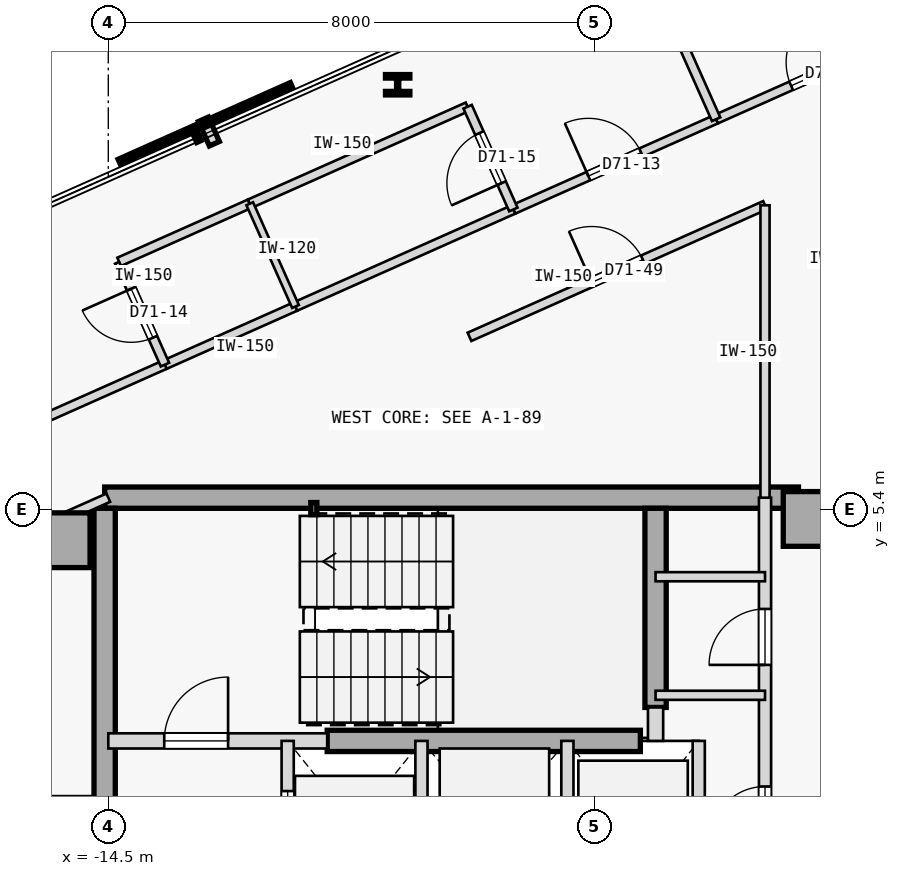
"""IFC4 building model, lengths in metres.
Left out: names, types, materials, properties, quantities, classifications, styles, units other than length and angle.
Written with IfcOpenShell. Run it as: python <this file> out.ifc"""

import sys

from ifc_helpers import new_model, si_unit, direction, frame, frame_2d, origin, origin_2d, place, context, subcontext, project, spatial, rectangle, hollow_rectangle, i_section, extrude, element, fill, save


model = new_model("IFC4")
c1 = context("Model", 3, precision=1e-05, world=origin(), true_north=direction((0.0, 1.0)))
c2 = subcontext(c1, "Body", "Model", "MODEL_VIEW")
j1 = project(units=[si_unit("LENGTHUNIT", "METRE"), si_unit("PLANEANGLEUNIT", "RADIAN")], contexts=[c1])
p1 = place(None, origin())
s1 = spatial("IfcSite", under=j1, at=p1, CompositionType="ELEMENT")
p2 = place(p1, origin())
s2 = spatial("IfcBuilding", under=s1, at=p2, CompositionType="ELEMENT")
p3 = place(p2, frame((0.0, 0.0, 265.55)))
s3 = spatial("IfcBuildingStorey", under=s2, at=p3, CompositionType="ELEMENT", Elevation=265.55)
for number, where, z_axis, x_axis in (
    (1, (-15.25, 4.9, 0.0), (0.0, 0.0, 1.0), (1.0, 0.0, 0.0)),
    (2, (-2.95, 5.25, 0.0), (0.0, 0.0, 1.0), (1.0, 0.0, 0.0)),
):
    element("IfcColumn", number, at=place(p3, frame(where, z_axis=z_axis, x_axis=x_axis)), inside=s3, PredefinedType="COLUMN", context=c2, shape_type="SweptSolid", body=[
        extrude(rectangle(XDim=0.9, YDim=0.9, at=origin_2d()), origin(), (0.0, 0.0, 1.0), 3.35),
    ])
p4 = place(p3, frame((-14.56, 5.6, 0.0), z_axis=(0.0, 0.0, 1.0), x_axis=(1.0, 0.0, 0.0)))
e3 = element("IfcWall", 3, at=p4, inside=s3, PredefinedType="SHEAR", context=c2, shape_type="SweptSolid", body=[
    extrude(rectangle(XDim=11.41, YDim=0.35, at=frame_2d((5.705, 0.0))), origin(), (0.0, 0.0, 1.0), 3.125),
])
p5 = place(p3, frame((-14.56, -5.425, 0.0), z_axis=(0.0, 0.0, 1.0), x_axis=(0.0, 1.0, 0.0)))
e4 = element("IfcWall", 4, at=p5, inside=s3, PredefinedType="SHEAR", context=c2, shape_type="SweptSolid", body=[
    extrude(rectangle(XDim=10.85, YDim=0.35, at=frame_2d((5.425, 0.0))), origin(), (0.0, 0.0, 1.0), 3.125),
])
p6 = place(p3, frame((-5.5, 2.15, 0.0), z_axis=(0.0, 0.0, 1.0), x_axis=(0.0, 1.0, 0.0)))
e5 = element("IfcWall", 5, at=p6, inside=s3, PredefinedType="SHEAR", context=c2, shape_type="SweptSolid", body=[
    extrude(rectangle(XDim=3.275, YDim=0.35, at=frame_2d((1.638, 0.0))), origin(), (0.0, 0.0, 1.0), 3.125),
])
p7 = place(p3, frame((-10.9, 1.6, 0.0), z_axis=(0.0, 0.0, 1.0), x_axis=(1.0, 0.0, 0.0)))
e6 = element("IfcWall", 6, at=p7, inside=s3, PredefinedType="SHEAR", context=c2, shape_type="SweptSolid", body=[
    extrude(rectangle(XDim=5.15, YDim=0.35, at=frame_2d((2.575, 0.0))), origin(), (0.0, 0.0, 1.0), 3.125),
])
p8 = place(p3, frame((-11.12, 5.42, 0.0), z_axis=(0.0, 0.0, 1.0), x_axis=(1.0, 0.0, 0.0)))
e7 = element("IfcColumn", 7, at=p8, inside=s3, PredefinedType="COLUMN", context=c2, shape_type="SweptSolid", body=[
    extrude(hollow_rectangle(XDim=0.1, YDim=0.2, WallThickness=0.008, at=origin_2d()), origin(), (0.0, 0.0, 1.0), 3.35),
])
p9 = place(p3, frame((-9.741, 12.39, 0.0), z_axis=(0.0, 0.0, 1.0), x_axis=(1.0, 0.0, 0.0)))
e8 = element("IfcColumn", 8, at=p9, inside=s3, PredefinedType="COLUMN", context=c2, shape_type="SweptSolid", body=[
    extrude(i_section(OverallWidth=0.401, OverallDepth=0.335, WebThickness=0.036, FlangeThickness=0.058, FilletRadius=0.015, at=origin_2d()), origin(), (0.0, 0.0, 1.0), 3.35),
])
p10 = place(p3, frame((-14.5, 1.6, 0.0), z_axis=(0.0, 0.0, 1.0), x_axis=(1.0, 0.0, 0.0)))
e9 = element("IfcWall", 9, at=p10, inside=s3, PredefinedType="STANDARD", context=c2, shape_type="SweptSolid", body=[
    extrude(rectangle(XDim=3.6, YDim=0.25, at=frame_2d((1.8, 0.0))), origin(), (0.0, 0.0, 1.0), 3.125),
])
p11 = place(p10, frame((0.92, 0.0, 0.0)))
e10 = element("IfcOpeningElement", 10, at=p11, cuts=e9, PredefinedType="OPENING", context=c2, shape_type="SweptSolid", body=[
    extrude(rectangle(XDim=1.05, YDim=2.15, at=frame_2d((0.525, 1.075))), frame((0.0, 0.135, 0.0), z_axis=(0.0, -1.0, 0.0), x_axis=(1.0, 0.0, 0.0)), (0.0, 0.0, 1.0), 0.27),
])
p12 = place(p3, frame((-5.5, 1.6, 0.0), z_axis=(0.0, 0.0, 1.0), x_axis=(0.0, 1.0, 0.0)))
e11 = element("IfcWall", 11, at=p12, inside=s3, PredefinedType="STANDARD", context=c2, shape_type="SweptSolid", body=[
    extrude(rectangle(XDim=0.55, YDim=0.25, at=frame_2d((0.275, 0.0))), origin(), (0.0, 0.0, 1.0), 3.125),
])
p13 = place(p3, frame((-3.7, -1.15, 0.0), z_axis=(0.0, 0.0, 1.0), x_axis=(0.0, 1.0, 0.0)))
e12 = element("IfcWall", 12, at=p13, inside=s3, PredefinedType="STANDARD", context=c2, shape_type="SweptSolid", body=[
    extrude(rectangle(XDim=6.75, YDim=0.2, at=frame_2d((3.375, 0.0))), origin(), (0.0, 0.0, 1.0), 3.125),
])
p14 = place(p13, frame((1.1, 0.0, 0.0)))
e13 = element("IfcOpeningElement", 13, at=p14, cuts=e12, PredefinedType="OPENING", context=c2, shape_type="SweptSolid", body=[
    extrude(rectangle(XDim=0.9, YDim=2.15, at=frame_2d((0.45, 1.075))), frame((0.0, 0.11, 0.0), z_axis=(0.0, -1.0, 0.0), x_axis=(1.0, 0.0, 0.0)), (0.0, 0.0, 1.0), 0.22),
])
p15 = place(p13, frame((4.0, 0.0, 0.0)))
e14 = element("IfcOpeningElement", 14, at=p15, cuts=e12, PredefinedType="OPENING", context=c2, shape_type="SweptSolid", body=[
    extrude(rectangle(XDim=0.92, YDim=2.15, at=frame_2d((0.46, 1.075))), frame((0.0, 0.11, 0.0), z_axis=(0.0, -1.0, 0.0), x_axis=(1.0, 0.0, 0.0)), (0.0, 0.0, 1.0), 0.22),
])
p16 = place(p3, frame((-11.55, -1.15, 0.0), z_axis=(0.0, 0.0, 1.0), x_axis=(0.0, 1.0, 0.0)))
e15 = element("IfcWall", 15, at=p16, inside=s3, PredefinedType="STANDARD", context=c2, shape_type="SweptSolid", body=[
    extrude(rectangle(XDim=2.75, YDim=0.2, at=frame_2d((1.375, 0.0))), origin(), (0.0, 0.0, 1.0), 3.125),
])
p17 = place(p16, frame((0.825, 0.0, 0.0)))
e16 = element("IfcOpeningElement", 16, at=p17, cuts=e15, PredefinedType="OPENING", context=c2, shape_type="SweptSolid", body=[
    extrude(rectangle(XDim=1.1, YDim=2.15, at=frame_2d((0.55, 1.075))), frame((0.0, 0.11, 0.0), z_axis=(0.0, -1.0, 0.0), x_axis=(1.0, 0.0, 0.0)), (0.0, 0.0, 1.0), 0.22),
])
for number, where, z_axis, x_axis in (
    (17, (-9.35, -1.15, 0.0), (0.0, 0.0, 1.0), (0.0, 1.0, 0.0)),
    (18, (-6.95, -1.15, 0.0), (0.0, 0.0, 1.0), (0.0, 1.0, 0.0)),
    (19, (-4.79, -1.15, 0.0), (0.0, 0.0, 1.0), (0.0, 1.0, 0.0)),
):
    element("IfcWall", number, at=place(p3, frame(where, z_axis=z_axis, x_axis=x_axis)), inside=s3, PredefinedType="STANDARD", context=c2, shape_type="SweptSolid", body=[
        extrude(rectangle(XDim=2.75, YDim=0.2, at=frame_2d((1.375, 0.0))), origin(), (0.0, 0.0, 1.0), 3.125),
    ])
for number, where, z_axis, x_axis in (
    (20, (-5.5, 4.3, 0.0), (0.0, 0.0, 1.0), (1.0, 0.0, 0.0)),
    (21, (-5.5, 2.35, 0.0), (0.0, 0.0, 1.0), (1.0, 0.0, 0.0)),
):
    element("IfcWall", number, at=place(p3, frame(where, z_axis=z_axis, x_axis=x_axis)), inside=s3, PredefinedType="PARTITIONING", context=c2, shape_type="SweptSolid", body=[
        extrude(rectangle(XDim=1.8, YDim=0.15, at=frame_2d((0.9, 0.0))), origin(), (0.0, 0.0, 1.0), 3.125),
    ])
p18 = place(p3, frame((-16.903, 6.303, 0.0), z_axis=(0.0, 0.0, 1.0), x_axis=(0.913543802, 0.40674036169, 0.0)))
e22 = element("IfcWall", 22, at=p18, inside=s3, PredefinedType="PARTITIONING", context=c2, shape_type="SweptSolid", body=[
    extrude(rectangle(XDim=3.65, YDim=0.15, at=frame_2d((1.825, 0.0))), origin(), (0.0, 0.0, 1.0), 3.125),
])
p19 = place(p3, frame((-7.839, 10.339, 0.0), z_axis=(0.0, 0.0, 1.0), x_axis=(0.913543802, 0.40674036169, 0.0)))
e23 = element("IfcWall", 23, at=p19, inside=s3, PredefinedType="PARTITIONING", context=c2, shape_type="SweptSolid", body=[
    extrude(rectangle(XDim=3.65, YDim=0.15, at=frame_2d((1.825, 0.0))), origin(), (0.0, 0.0, 1.0), 3.125),
])
p20 = place(p19, frame((1.35, 0.0, 0.0)))
e24 = element("IfcOpeningElement", 24, at=p20, cuts=e23, PredefinedType="OPENING", context=c2, shape_type="SweptSolid", body=[
    extrude(rectangle(XDim=0.95, YDim=2.15, at=frame_2d((0.475, 1.075))), frame((0.0, 0.085, 0.0), z_axis=(0.0, -1.0, 0.0), x_axis=(1.0, 0.0, 0.0)), (0.0, 0.0, 1.0), 0.17),
])
p21 = place(p3, frame((-13.568, 7.788, 0.0), z_axis=(0.0, 0.0, 1.0), x_axis=(0.913558622212, 0.406707073682, 0.0)))
e25 = element("IfcWall", 25, at=p21, inside=s3, PredefinedType="PARTITIONING", context=c2, shape_type="SweptSolid", body=[
    extrude(rectangle(XDim=2.35, YDim=0.15, at=frame_2d((1.175, 0.0))), origin(), (0.0, 0.0, 1.0), 3.125),
])
p22 = place(p3, frame((-11.421, 8.744, 0.0), z_axis=(0.0, 0.0, 1.0), x_axis=(0.913539234326, 0.406750620585, 0.0)))
e26 = element("IfcWall", 26, at=p22, inside=s3, PredefinedType="PARTITIONING", context=c2, shape_type="SweptSolid", body=[
    extrude(rectangle(XDim=3.922, YDim=0.15, at=frame_2d((1.961, 0.0))), origin(), (0.0, 0.0, 1.0), 3.125),
])
p23 = place(p3, frame((-4.504, 11.823, 0.0), z_axis=(0.0, 0.0, 1.0), x_axis=(0.913543802, 0.40674036169, 0.0)))
e27 = element("IfcWall", 27, at=p23, inside=s3, PredefinedType="PARTITIONING", context=c2, shape_type="SweptSolid", body=[
    extrude(rectangle(XDim=3.65, YDim=0.15, at=frame_2d((1.825, 0.0))), origin(), (0.0, 0.0, 1.0), 3.125),
])
p24 = place(p23, frame((1.35, 0.0, 0.0)))
e28 = element("IfcOpeningElement", 28, at=p24, cuts=e27, PredefinedType="OPENING", context=c2, shape_type="SweptSolid", body=[
    extrude(rectangle(XDim=0.95, YDim=2.15, at=frame_2d((0.475, 1.075))), frame((0.0, 0.085, 0.0), z_axis=(0.0, -1.0, 0.0), x_axis=(1.0, 0.0, 0.0)), (0.0, 0.0, 1.0), 0.17),
])
p25 = place(p3, frame((-18.661, 3.747, 0.0), z_axis=(0.0, 0.0, 1.0), x_axis=(0.913535055583, 0.40676000568, 0.0)))
e29 = element("IfcWall", 29, at=p25, inside=s3, PredefinedType="PARTITIONING", context=c2, shape_type="SweptSolid", body=[
    extrude(rectangle(XDim=4.555, YDim=0.15, at=frame_2d((2.277, 0.0))), origin(), (0.0, 0.0, 1.0), 3.125),
])
p26 = place(p25, frame((1.134, 0.0, 0.0)))
e30 = element("IfcOpeningElement", 30, at=p26, cuts=e29, PredefinedType="OPENING", context=c2, shape_type="SweptSolid", body=[
    extrude(rectangle(XDim=0.92, YDim=2.15, at=frame_2d((0.46, 1.075))), frame((0.0, 0.085, 0.0), z_axis=(0.0, -1.0, 0.0), x_axis=(1.0, 0.0, 0.0)), (0.0, 0.0, 1.0), 0.17),
])
p27 = place(p3, frame((-8.56, 8.244, 0.0), z_axis=(0.0, 0.0, 1.0), x_axis=(0.91354831274, 0.406730230362, 0.0)))
e31 = element("IfcWall", 31, at=p27, inside=s3, PredefinedType="PARTITIONING", context=c2, shape_type="SweptSolid", body=[
    extrude(rectangle(XDim=5.32, YDim=0.15, at=frame_2d((2.66, 0.0))), origin(), (0.0, 0.0, 1.0), 3.125),
])
p28 = place(p27, frame((2.2, 0.0, 0.0)))
e32 = element("IfcOpeningElement", 32, at=p28, cuts=e31, PredefinedType="OPENING", context=c2, shape_type="SweptSolid", body=[
    extrude(rectangle(XDim=0.92, YDim=2.15, at=frame_2d((0.46, 1.075))), frame((0.0, 0.085, 0.0), z_axis=(0.0, -1.0, 0.0), x_axis=(1.0, 0.0, 0.0)), (0.0, 0.0, 1.0), 0.17),
])
p29 = place(p3, frame((-3.7, 5.6, 0.0), z_axis=(0.0, 0.0, 1.0), x_axis=(5.077173e-05, 0.999999998711, 0.0)))
e33 = element("IfcWall", 33, at=p29, inside=s3, PredefinedType="PARTITIONING", context=c2, shape_type="SweptSolid", body=[
    extrude(rectangle(XDim=4.809, YDim=0.15, at=frame_2d((2.404, 0.0))), origin(), (0.0, 0.0, 1.0), 3.125),
])
p30 = place(p3, frame((-13.568, 7.788, 0.0), z_axis=(0.0, 0.0, 1.0), x_axis=(-0.406750635596, 0.913539227643, 0.0)))
e34 = element("IfcWall", 34, at=p30, inside=s3, PredefinedType="PARTITIONING", context=c2, shape_type="SweptSolid", body=[
    extrude(rectangle(XDim=1.85, YDim=0.15, at=frame_2d((0.925, 0.0))), origin(), (0.0, 0.0, 1.0), 3.125),
])
p31 = place(p30, frame((0.485, 0.0, 0.0)))
e35 = element("IfcOpeningElement", 35, at=p31, cuts=e34, PredefinedType="OPENING", context=c2, shape_type="SweptSolid", body=[
    extrude(rectangle(XDim=0.88, YDim=2.15, at=frame_2d((0.44, 1.075))), frame((0.0, 0.085, 0.0), z_axis=(0.0, -1.0, 0.0), x_axis=(1.0, 0.0, 0.0)), (0.0, 0.0, 1.0), 0.17),
])
p32 = place(p3, frame((-14.321, 9.478, 0.0), z_axis=(0.0, 0.0, 1.0), x_axis=(0.913502828817, 0.406832375486, 0.0)))
e36 = element("IfcWall", 36, at=p32, inside=s3, PredefinedType="PARTITIONING", context=c2, shape_type="SweptSolid", body=[
    extrude(rectangle(XDim=2.35, YDim=0.15, at=frame_2d((1.175, 0.0))), origin(), (0.0, 0.0, 1.0), 3.125),
])
p33 = place(p3, frame((-12.174, 10.434, 0.0), z_axis=(0.0, 0.0, 1.0), x_axis=(0.913549532696, 0.406727490232, 0.0)))
e37 = element("IfcWall", 37, at=p33, inside=s3, PredefinedType="PARTITIONING", context=c2, shape_type="SweptSolid", body=[
    extrude(rectangle(XDim=3.922, YDim=0.15, at=frame_2d((1.961, 0.0))), origin(), (0.0, 0.0, 1.0), 3.125),
])
p34 = place(p3, frame((-7.839, 10.339, 0.0), z_axis=(0.0, 0.0, 1.0), x_axis=(-0.406701600856, 0.913561058639, 0.0)))
e38 = element("IfcWall", 38, at=p34, inside=s3, PredefinedType="PARTITIONING", context=c2, shape_type="SweptSolid", body=[
    extrude(rectangle(XDim=1.85, YDim=0.15, at=frame_2d((0.925, 0.0))), origin(), (0.0, 0.0, 1.0), 3.125),
])
p35 = place(p34, frame((0.475, 0.0, 0.0)))
e39 = element("IfcOpeningElement", 39, at=p35, cuts=e38, PredefinedType="OPENING", context=c2, shape_type="SweptSolid", body=[
    extrude(rectangle(XDim=0.9, YDim=2.15, at=frame_2d((0.45, 1.075))), frame((0.0, 0.085, 0.0), z_axis=(0.0, -1.0, 0.0), x_axis=(1.0, 0.0, 0.0)), (0.0, 0.0, 1.0), 0.17),
])
p36 = place(p3, frame((-4.504, 11.823, 0.0), z_axis=(0.0, 0.0, 1.0), x_axis=(-0.406733350739, 0.913546923478, 0.0)))
e40 = element("IfcWall", 40, at=p36, inside=s3, PredefinedType="PARTITIONING", context=c2, shape_type="SweptSolid", body=[
    extrude(rectangle(XDim=3.198, YDim=0.15, at=frame_2d((1.599, 0.0))), origin(), (0.0, 0.0, 1.0), 3.125),
])
p37 = place(p3, frame((-11.421, 8.744, 0.0), z_axis=(0.0, 0.0, 1.0), x_axis=(-0.406811725227, 0.913512025218, 0.0)))
e41 = element("IfcWall", 41, at=p37, inside=s3, PredefinedType="PARTITIONING", context=c2, shape_type="SweptSolid", body=[
    extrude(rectangle(XDim=1.85, YDim=0.12, at=frame_2d((0.925, 0.0))), origin(), (0.0, 0.0, 1.0), 3.125),
])
p38 = place(p11, origin())
e42 = element("IfcDoor", 42, at=p38, inside=s3, OperationType="SINGLE_SWING_RIGHT", PredefinedType="DOOR", context=c2, shape_type="SweptSolid", body=[
    extrude(rectangle(XDim=1.05, YDim=2.15, at=frame_2d((0.525, 1.075))), frame((0.0, 0.025, 0.0), z_axis=(0.0, -1.0, 0.0), x_axis=(1.0, 0.0, 0.0)), (0.0, 0.0, 1.0), 0.05),
])
fill(e10, e42)
p39 = place(p17, origin())
e43 = element("IfcDoor", 43, at=p39, inside=s3, OperationType="SLIDING_TO_RIGHT", PredefinedType="DOOR", context=c2, shape_type="SweptSolid", body=[
    extrude(rectangle(XDim=1.1, YDim=2.15, at=frame_2d((0.55, 1.075))), frame((0.0, 0.025, 0.0), z_axis=(0.0, -1.0, 0.0), x_axis=(1.0, 0.0, 0.0)), (0.0, 0.0, 1.0), 0.05),
])
fill(e16, e43)
p40 = place(p14, origin())
e44 = element("IfcDoor", 44, at=p40, inside=s3, OperationType="SINGLE_SWING_LEFT", PredefinedType="DOOR", context=c2, shape_type="SweptSolid", body=[
    extrude(rectangle(XDim=0.9, YDim=2.15, at=frame_2d((0.45, 1.075))), frame((0.0, 0.025, 0.0), z_axis=(0.0, -1.0, 0.0), x_axis=(1.0, 0.0, 0.0)), (0.0, 0.0, 1.0), 0.05),
])
fill(e13, e44)
p41 = place(p15, origin())
e45 = element("IfcDoor", 45, at=p41, inside=s3, OperationType="SINGLE_SWING_LEFT", PredefinedType="DOOR", context=c2, shape_type="SweptSolid", body=[
    extrude(rectangle(XDim=0.92, YDim=2.15, at=frame_2d((0.46, 1.075))), frame((0.0, 0.025, 0.0), z_axis=(0.0, -1.0, 0.0), x_axis=(1.0, 0.0, 0.0)), (0.0, 0.0, 1.0), 0.05),
])
fill(e14, e45)
p42 = place(p20, origin())
e46 = element("IfcDoor", 46, at=p42, inside=s3, OperationType="SINGLE_SWING_LEFT", PredefinedType="DOOR", context=c2, shape_type="SweptSolid", body=[
    extrude(rectangle(XDim=0.95, YDim=2.15, at=frame_2d((0.475, 1.075))), frame((0.0, 0.025, 0.0), z_axis=(0.0, -1.0, 0.0), x_axis=(1.0, 0.0, 0.0)), (0.0, 0.0, 1.0), 0.05),
])
fill(e24, e46)
p43 = place(p31, origin())
e47 = element("IfcDoor", 47, at=p43, inside=s3, OperationType="SINGLE_SWING_RIGHT", PredefinedType="DOOR", context=c2, shape_type="SweptSolid", body=[
    extrude(rectangle(XDim=0.88, YDim=2.15, at=frame_2d((0.44, 1.075))), frame((0.0, 0.025, 0.0), z_axis=(0.0, -1.0, 0.0), x_axis=(1.0, 0.0, 0.0)), (0.0, 0.0, 1.0), 0.05),
])
fill(e35, e47)
p44 = place(p35, origin())
e48 = element("IfcDoor", 48, at=p44, inside=s3, OperationType="SINGLE_SWING_LEFT", PredefinedType="DOOR", context=c2, shape_type="SweptSolid", body=[
    extrude(rectangle(XDim=0.9, YDim=2.15, at=frame_2d((0.45, 1.075))), frame((0.0, 0.025, 0.0), z_axis=(0.0, -1.0, 0.0), x_axis=(1.0, 0.0, 0.0)), (0.0, 0.0, 1.0), 0.05),
])
fill(e39, e48)
p45 = place(p24, origin())
e49 = element("IfcDoor", 49, at=p45, inside=s3, OperationType="SINGLE_SWING_RIGHT", PredefinedType="DOOR", context=c2, shape_type="SweptSolid", body=[
    extrude(rectangle(XDim=0.95, YDim=2.15, at=frame_2d((0.475, 1.075))), frame((0.0, 0.025, 0.0), z_axis=(0.0, -1.0, 0.0), x_axis=(1.0, 0.0, 0.0)), (0.0, 0.0, 1.0), 0.05),
])
fill(e28, e49)
p46 = place(p28, origin())
e50 = element("IfcDoor", 50, at=p46, inside=s3, OperationType="SINGLE_SWING_LEFT", PredefinedType="DOOR", context=c2, shape_type="SweptSolid", body=[
    extrude(rectangle(XDim=0.92, YDim=2.15, at=frame_2d((0.46, 1.075))), frame((0.0, 0.025, 0.0), z_axis=(0.0, -1.0, 0.0), x_axis=(1.0, 0.0, 0.0)), (0.0, 0.0, 1.0), 0.05),
])
fill(e32, e50)
save(model, sys.argv[1])
